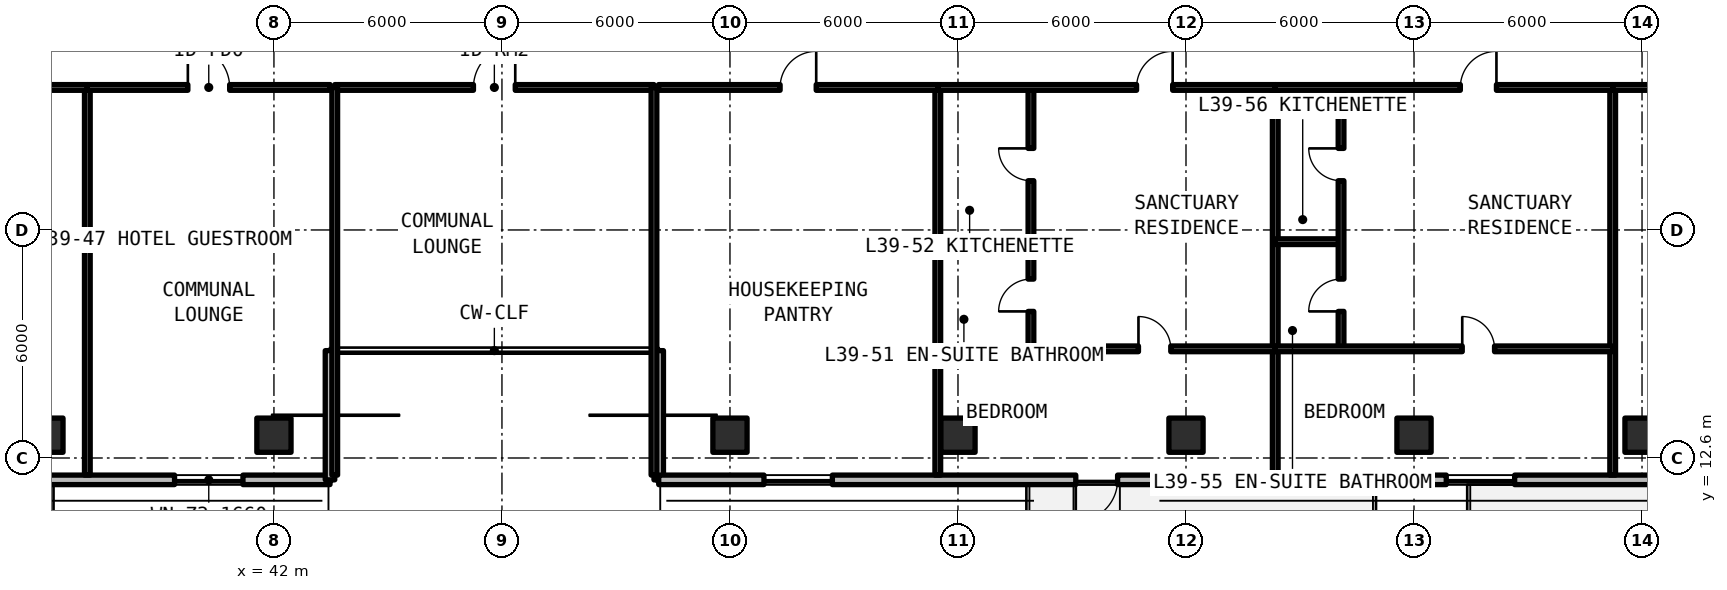
"""IFC4 building model, lengths in metres.
Left out: names, types, materials, properties, quantities, classifications, styles, units other than length and angle.
Written with IfcOpenShell. Run it as: python <this file> out.ifc"""

import sys

from ifc_helpers import new_model, si_unit, direction, frame, frame_2d, origin, origin_2d, place, context, subcontext, project, spatial, rectangle, extrude, element, fill, save


model = new_model("IFC4")
c1 = context("Model", 3, precision=1e-05, world=origin(), true_north=direction((0.0, 1.0)))
c2 = subcontext(c1, "Body", "Model", "MODEL_VIEW")
j1 = project(units=[si_unit("LENGTHUNIT", "METRE"), si_unit("PLANEANGLEUNIT", "RADIAN")], contexts=[c1])
p1 = place(None, origin())
s1 = spatial("IfcSite", under=j1, at=p1, CompositionType="ELEMENT")
p2 = place(p1, origin())
s2 = spatial("IfcBuilding", under=s1, at=p2, CompositionType="ELEMENT")
p3 = place(p2, frame((0.0, 0.0, 141.9)))
s3 = spatial("IfcBuildingStorey", under=s2, at=p3, CompositionType="ELEMENT", Elevation=141.9)
for number, where, z_axis, x_axis in (
    (1, (36.0, 13.2, 0.0), (0.0, 0.0, 1.0), (1.0, 0.0, 0.0)),
    (2, (42.0, 13.2, 0.0), (0.0, 0.0, 1.0), (1.0, 0.0, 0.0)),
    (3, (54.0, 13.2, 0.0), (0.0, 0.0, 1.0), (1.0, 0.0, 0.0)),
    (4, (60.0, 13.2, 0.0), (0.0, 0.0, 1.0), (1.0, 0.0, 0.0)),
    (5, (66.0, 13.2, 0.0), (0.0, 0.0, 1.0), (1.0, 0.0, 0.0)),
    (6, (72.0, 13.2, 0.0), (0.0, 0.0, 1.0), (1.0, 0.0, 0.0)),
    (7, (78.0, 13.2, 0.0), (0.0, 0.0, 1.0), (1.0, 0.0, 0.0)),
):
    element("IfcColumn", number, at=place(p3, frame(where, z_axis=z_axis, x_axis=x_axis)), inside=s3, PredefinedType="COLUMN", context=c2, shape_type="SweptSolid", body=[
        extrude(rectangle(XDim=0.9, YDim=0.9, at=origin_2d()), origin(), (0.0, 0.0, 1.0), 3.3),
    ])
p4 = place(p3, frame((23.852, 12.025, 0.0), z_axis=(0.0, 0.0, 1.0), x_axis=(1.0, 0.0, 0.0)))
e8 = element("IfcWall", 8, at=p4, inside=s3, PredefinedType="SOLIDWALL", context=c2, shape_type="SweptSolid", body=[
    extrude(rectangle(XDim=19.623, YDim=0.25, at=frame_2d((9.812, 0.0))), origin(), (0.0, 0.0, 1.0), 3.08),
])
p5 = place(p4, frame((3.598, 0.0, 0.0)))
e9 = element("IfcOpeningElement", 9, at=p5, cuts=e8, PredefinedType="OPENING", context=c2, shape_type="SweptSolid", body=[
    extrude(rectangle(XDim=1.1, YDim=2.15, at=frame_2d((0.55, 1.075))), frame((0.0, 0.135, 0.0), z_axis=(0.0, -1.0, 0.0), x_axis=(1.0, 0.0, 0.0)), (0.0, 0.0, 1.0), 0.27),
])
p6 = place(p4, frame((7.861, 0.0, 0.78)))
e10 = element("IfcOpeningElement", 10, at=p6, cuts=e8, PredefinedType="OPENING", context=c2, shape_type="SweptSolid", body=[
    extrude(rectangle(XDim=0.85, YDim=1.65, at=frame_2d((0.425, 0.825))), frame((0.0, 0.135, 0.0), z_axis=(0.0, -1.0, 0.0), x_axis=(1.0, 0.0, 0.0)), (0.0, 0.0, 1.0), 0.27),
])
p7 = place(p4, frame((9.915, 0.0, 0.78)))
e11 = element("IfcOpeningElement", 11, at=p7, cuts=e8, PredefinedType="OPENING", context=c2, shape_type="SweptSolid", body=[
    extrude(rectangle(XDim=1.4, YDim=1.65, at=frame_2d((0.7, 0.825))), frame((0.0, 0.135, 0.0), z_axis=(0.0, -1.0, 0.0), x_axis=(1.0, 0.0, 0.0)), (0.0, 0.0, 1.0), 0.27),
])
p8 = place(p4, frame((15.533, 0.0, 0.78)))
e12 = element("IfcOpeningElement", 12, at=p8, cuts=e8, PredefinedType="OPENING", context=c2, shape_type="SweptSolid", body=[
    extrude(rectangle(XDim=1.8, YDim=1.66, at=frame_2d((0.9, 0.83))), frame((0.0, 0.135, 0.0), z_axis=(0.0, -1.0, 0.0), x_axis=(1.0, 0.0, 0.0)), (0.0, 0.0, 1.0), 0.27),
])
for number, where, z_axis, x_axis in (
    (13, (43.475, 12.025, 0.0), (0.0, 0.0, 1.0), (0.0, 1.0, 0.0)),
    (14, (52.125, 15.425, 0.0), (0.0, 0.0, 1.0), (0.0, -1.0, 0.0)),
):
    element("IfcWall", number, at=place(p3, frame(where, z_axis=z_axis, x_axis=x_axis)), inside=s3, PredefinedType="SOLIDWALL", context=c2, shape_type="SweptSolid", body=[
        extrude(rectangle(XDim=3.4, YDim=0.25, at=frame_2d((1.7, 0.0))), origin(), (0.0, 0.0, 1.0), 3.08),
    ])
p9 = place(p3, frame((52.125, 12.025, 0.0), z_axis=(0.0, 0.0, 1.0), x_axis=(1.0, 0.0, 0.0)))
e15 = element("IfcWall", 15, at=p9, inside=s3, PredefinedType="SOLIDWALL", context=c2, shape_type="SweptSolid", body=[
    extrude(rectangle(XDim=43.623, YDim=0.25, at=frame_2d((21.812, 0.0))), origin(), (0.0, 0.0, 1.0), 3.08),
])
p10 = place(p9, frame((10.975, 0.0, 0.0)))
e16 = element("IfcOpeningElement", 16, at=p10, cuts=e15, PredefinedType="OPENING", context=c2, shape_type="SweptSolid", body=[
    extrude(rectangle(XDim=1.1, YDim=2.15, at=frame_2d((0.55, 1.075))), frame((0.0, 0.135, 0.0), z_axis=(0.0, -1.0, 0.0), x_axis=(1.0, 0.0, 0.0)), (0.0, 0.0, 1.0), 0.27),
])
p11 = place(p9, frame((27.575, 0.0, 0.0)))
e17 = element("IfcOpeningElement", 17, at=p11, cuts=e15, PredefinedType="OPENING", context=c2, shape_type="SweptSolid", body=[
    extrude(rectangle(XDim=1.1, YDim=2.15, at=frame_2d((0.55, 1.075))), frame((0.0, 0.135, 0.0), z_axis=(0.0, -1.0, 0.0), x_axis=(1.0, 0.0, 0.0)), (0.0, 0.0, 1.0), 0.27),
])
p12 = place(p9, frame((2.769, 0.0, 0.78)))
e18 = element("IfcOpeningElement", 18, at=p12, cuts=e15, PredefinedType="OPENING", context=c2, shape_type="SweptSolid", body=[
    extrude(rectangle(XDim=1.8, YDim=1.66, at=frame_2d((0.9, 0.83))), frame((0.0, 0.135, 0.0), z_axis=(0.0, -1.0, 0.0), x_axis=(1.0, 0.0, 0.0)), (0.0, 0.0, 1.0), 0.27),
])
p13 = place(p9, frame((20.723, 0.0, 0.78)))
e19 = element("IfcOpeningElement", 19, at=p13, cuts=e15, PredefinedType="OPENING", context=c2, shape_type="SweptSolid", body=[
    extrude(rectangle(XDim=1.8, YDim=1.66, at=frame_2d((0.9, 0.83))), frame((0.0, 0.135, 0.0), z_axis=(0.0, -1.0, 0.0), x_axis=(1.0, 0.0, 0.0)), (0.0, 0.0, 1.0), 0.27),
])
p14 = place(p9, frame((38.775, 0.0, 0.78)))
e20 = element("IfcOpeningElement", 20, at=p14, cuts=e15, PredefinedType="OPENING", context=c2, shape_type="SweptSolid", body=[
    extrude(rectangle(XDim=1.8, YDim=1.66, at=frame_2d((0.9, 0.83))), frame((0.0, 0.135, 0.0), z_axis=(0.0, -1.0, 0.0), x_axis=(1.0, 0.0, 0.0)), (0.0, 0.0, 1.0), 0.27),
])
p15 = place(p3, frame((43.6, 22.35, 0.0), z_axis=(0.0, 0.0, 1.0), x_axis=(1.0, 0.0, 0.0)))
e21 = element("IfcWall", 21, at=p15, inside=s3, PredefinedType="SOLIDWALL", context=c2, shape_type="SweptSolid", body=[
    extrude(rectangle(XDim=8.4, YDim=0.15, at=frame_2d((4.2, 0.0))), origin(), (0.0, 0.0, 1.0), 2.35),
])
p16 = place(p15, frame((3.65, 0.0, 0.0)))
e22 = element("IfcOpeningElement", 22, at=p16, cuts=e21, PredefinedType="OPENING", context=c2, shape_type="SweptSolid", body=[
    extrude(rectangle(XDim=1.1, YDim=2.15, at=frame_2d((0.55, 1.075))), frame((0.0, 0.085, 0.0), z_axis=(0.0, -1.0, 0.0), x_axis=(1.0, 0.0, 0.0)), (0.0, 0.0, 1.0), 0.17),
])
for number, where, z_axis, x_axis in (
    (23, (43.6, 12.15, 0.0), (0.0, 0.0, 1.0), (0.0, 1.0, 0.0)),
    (24, (52.0, 12.15, 0.0), (0.0, 0.0, 1.0), (0.0, 1.0, 0.0)),
    (25, (37.09, 12.15, 0.0), (0.0, 0.0, 1.0), (0.0, 1.0, 0.0)),
):
    element("IfcWall", number, at=place(p3, frame(where, z_axis=z_axis, x_axis=x_axis)), inside=s3, PredefinedType="SOLIDWALL", context=c2, shape_type="SweptSolid", body=[
        extrude(rectangle(XDim=10.2, YDim=0.15, at=frame_2d((5.1, 0.0))), origin(), (0.0, 0.0, 1.0), 2.35),
    ])
p17 = place(p3, frame((31.112, 22.35, 0.0), z_axis=(0.0, 0.0, 1.0), x_axis=(1.0, 0.0, 0.0)))
e26 = element("IfcWall", 26, at=p17, inside=s3, PredefinedType="SOLIDWALL", context=c2, shape_type="SweptSolid", body=[
    extrude(rectangle(XDim=5.978, YDim=0.15, at=frame_2d((2.989, 0.0))), origin(), (0.0, 0.0, 1.0), 2.35),
])
p18 = place(p17, frame((3.57, 0.0, 0.0)))
e27 = element("IfcOpeningElement", 27, at=p18, cuts=e26, PredefinedType="OPENING", context=c2, shape_type="SweptSolid", body=[
    extrude(rectangle(XDim=0.95, YDim=2.15, at=frame_2d((0.475, 1.075))), frame((0.0, 0.085, 0.0), z_axis=(0.0, -1.0, 0.0), x_axis=(1.0, 0.0, 0.0)), (0.0, 0.0, 1.0), 0.17),
])
p19 = place(p3, frame((37.09, 22.35, 0.0), z_axis=(0.0, 0.0, 1.0), x_axis=(1.0, 0.0, 0.0)))
e28 = element("IfcWall", 28, at=p19, inside=s3, PredefinedType="SOLIDWALL", context=c2, shape_type="SweptSolid", body=[
    extrude(rectangle(XDim=6.39, YDim=0.15, at=frame_2d((3.195, 0.0))), origin(), (0.0, 0.0, 1.0), 2.35),
])
p20 = place(p19, frame((2.645, 0.0, 0.0)))
e29 = element("IfcOpeningElement", 29, at=p20, cuts=e28, PredefinedType="OPENING", context=c2, shape_type="SweptSolid", body=[
    extrude(rectangle(XDim=1.1, YDim=2.15, at=frame_2d((0.55, 1.075))), frame((0.0, 0.085, 0.0), z_axis=(0.0, -1.0, 0.0), x_axis=(1.0, 0.0, 0.0)), (0.0, 0.0, 1.0), 0.17),
])
p21 = place(p3, frame((59.469, 12.15, 0.0), z_axis=(0.0, 0.0, 1.0), x_axis=(0.0, 1.0, 0.0)))
e30 = element("IfcWall", 30, at=p21, inside=s3, PredefinedType="SOLIDWALL", context=c2, shape_type="SweptSolid", body=[
    extrude(rectangle(XDim=10.2, YDim=0.15, at=frame_2d((5.1, 0.0))), origin(), (0.0, 0.0, 1.0), 2.35),
])
p22 = place(p3, frame((52.12, 22.35, 0.0), z_axis=(0.0, 0.0, 1.0), x_axis=(1.0, 0.0, 0.0)))
e31 = element("IfcWall", 31, at=p22, inside=s3, PredefinedType="SOLIDWALL", context=c2, shape_type="SweptSolid", body=[
    extrude(rectangle(XDim=7.349, YDim=0.15, at=frame_2d((3.674, 0.0))), origin(), (0.0, 0.0, 1.0), 2.35),
])
p23 = place(p22, frame((3.199, 0.0, 0.0)))
e32 = element("IfcOpeningElement", 32, at=p23, cuts=e31, PredefinedType="OPENING", context=c2, shape_type="SweptSolid", body=[
    extrude(rectangle(XDim=0.95, YDim=2.15, at=frame_2d((0.475, 1.075))), frame((0.0, 0.085, 0.0), z_axis=(0.0, -1.0, 0.0), x_axis=(1.0, 0.0, 0.0)), (0.0, 0.0, 1.0), 0.17),
])
p24 = place(p3, frame((68.348, 12.15, 0.0), z_axis=(0.0, 0.0, 1.0), x_axis=(0.0, 1.0, 0.0)))
e33 = element("IfcWall", 33, at=p24, inside=s3, PredefinedType="SOLIDWALL", context=c2, shape_type="SweptSolid", body=[
    extrude(rectangle(XDim=10.2, YDim=0.15, at=frame_2d((5.1, 0.0))), origin(), (0.0, 0.0, 1.0), 2.35),
])
p25 = place(p3, frame((59.469, 18.292, 0.0), z_axis=(0.0, 0.0, 1.0), x_axis=(1.0, 0.0, 0.0)))
e34 = element("IfcWall", 34, at=p25, inside=s3, PredefinedType="PARTITIONING", context=c2, shape_type="SweptSolid", body=[
    extrude(rectangle(XDim=2.451, YDim=0.15, at=frame_2d((1.226, 0.0))), origin(), (0.0, 0.0, 1.0), 2.35),
])
p26 = place(p3, frame((61.92, 15.472, 0.0), z_axis=(0.0, 0.0, 1.0), x_axis=(0.0, 1.0, 0.0)))
e35 = element("IfcWall", 35, at=p26, inside=s3, PredefinedType="PARTITIONING", context=c2, shape_type="SweptSolid", body=[
    extrude(rectangle(XDim=6.878, YDim=0.15, at=frame_2d((3.439, 0.0))), origin(), (0.0, 0.0, 1.0), 2.35),
])
p27 = place(p26, frame((0.985, 0.0, 0.0)))
e36 = element("IfcOpeningElement", 36, at=p27, cuts=e35, PredefinedType="OPENING", context=c2, shape_type="SweptSolid", body=[
    extrude(rectangle(XDim=0.85, YDim=2.1, at=frame_2d((0.425, 1.05))), frame((0.0, 0.085, 0.0), z_axis=(0.0, -1.0, 0.0), x_axis=(1.0, 0.0, 0.0)), (0.0, 0.0, 1.0), 0.17),
])
p28 = place(p26, frame((4.424, 0.0, 0.0)))
e37 = element("IfcOpeningElement", 37, at=p28, cuts=e35, PredefinedType="OPENING", context=c2, shape_type="SweptSolid", body=[
    extrude(rectangle(XDim=0.85, YDim=2.1, at=frame_2d((0.425, 1.05))), frame((0.0, 0.085, 0.0), z_axis=(0.0, -1.0, 0.0), x_axis=(1.0, 0.0, 0.0)), (0.0, 0.0, 1.0), 0.17),
])
p29 = place(p3, frame((59.469, 15.472, 0.0), z_axis=(0.0, 0.0, 1.0), x_axis=(1.0, 0.0, 0.0)))
e38 = element("IfcWall", 38, at=p29, inside=s3, PredefinedType="PARTITIONING", context=c2, shape_type="SweptSolid", body=[
    extrude(rectangle(XDim=8.88, YDim=0.15, at=frame_2d((4.44, 0.0))), origin(), (0.0, 0.0, 1.0), 2.35),
])
p30 = place(p29, frame((5.281, 0.0, 0.0)))
e39 = element("IfcOpeningElement", 39, at=p30, cuts=e38, PredefinedType="OPENING", context=c2, shape_type="SweptSolid", body=[
    extrude(rectangle(XDim=0.85, YDim=2.1, at=frame_2d((0.425, 1.05))), frame((0.0, 0.085, 0.0), z_axis=(0.0, -1.0, 0.0), x_axis=(1.0, 0.0, 0.0)), (0.0, 0.0, 1.0), 0.17),
])
p31 = place(p3, frame((59.469, 22.35, 0.0), z_axis=(0.0, 0.0, 1.0), x_axis=(1.0, 0.0, 0.0)))
e40 = element("IfcWall", 40, at=p31, inside=s3, PredefinedType="SOLIDWALL", context=c2, shape_type="SweptSolid", body=[
    extrude(rectangle(XDim=8.88, YDim=0.15, at=frame_2d((4.44, 0.0))), origin(), (0.0, 0.0, 1.0), 2.35),
])
p32 = place(p31, frame((5.23, 0.0, 0.0)))
e41 = element("IfcOpeningElement", 41, at=p32, cuts=e40, PredefinedType="OPENING", context=c2, shape_type="SweptSolid", body=[
    extrude(rectangle(XDim=0.95, YDim=2.15, at=frame_2d((0.475, 1.075))), frame((0.0, 0.085, 0.0), z_axis=(0.0, -1.0, 0.0), x_axis=(1.0, 0.0, 0.0)), (0.0, 0.0, 1.0), 0.17),
])
p33 = place(p3, frame((77.228, 12.15, 0.0), z_axis=(0.0, 0.0, 1.0), x_axis=(0.0, 1.0, 0.0)))
e42 = element("IfcWall", 42, at=p33, inside=s3, PredefinedType="SOLIDWALL", context=c2, shape_type="SweptSolid", body=[
    extrude(rectangle(XDim=10.2, YDim=0.15, at=frame_2d((5.1, 0.0))), origin(), (0.0, 0.0, 1.0), 2.35),
])
p34 = place(p3, frame((68.348, 18.292, 0.0), z_axis=(0.0, 0.0, 1.0), x_axis=(1.0, 0.0, 0.0)))
e43 = element("IfcWall", 43, at=p34, inside=s3, PredefinedType="PARTITIONING", context=c2, shape_type="SweptSolid", body=[
    extrude(rectangle(XDim=1.732, YDim=0.15, at=frame_2d((0.866, 0.0))), origin(), (0.0, 0.0, 1.0), 2.35),
])
p35 = place(p3, frame((70.08, 15.472, 0.0), z_axis=(0.0, 0.0, 1.0), x_axis=(0.0, 1.0, 0.0)))
e44 = element("IfcWall", 44, at=p35, inside=s3, PredefinedType="PARTITIONING", context=c2, shape_type="SweptSolid", body=[
    extrude(rectangle(XDim=6.878, YDim=0.15, at=frame_2d((3.439, 0.0))), origin(), (0.0, 0.0, 1.0), 2.35),
])
p36 = place(p35, frame((0.985, 0.0, 0.0)))
e45 = element("IfcOpeningElement", 45, at=p36, cuts=e44, PredefinedType="OPENING", context=c2, shape_type="SweptSolid", body=[
    extrude(rectangle(XDim=0.85, YDim=2.1, at=frame_2d((0.425, 1.05))), frame((0.0, 0.085, 0.0), z_axis=(0.0, -1.0, 0.0), x_axis=(1.0, 0.0, 0.0)), (0.0, 0.0, 1.0), 0.17),
])
p37 = place(p35, frame((4.424, 0.0, 0.0)))
e46 = element("IfcOpeningElement", 46, at=p37, cuts=e44, PredefinedType="OPENING", context=c2, shape_type="SweptSolid", body=[
    extrude(rectangle(XDim=0.85, YDim=2.1, at=frame_2d((0.425, 1.05))), frame((0.0, 0.085, 0.0), z_axis=(0.0, -1.0, 0.0), x_axis=(1.0, 0.0, 0.0)), (0.0, 0.0, 1.0), 0.17),
])
p38 = place(p3, frame((68.348, 15.472, 0.0), z_axis=(0.0, 0.0, 1.0), x_axis=(1.0, 0.0, 0.0)))
e47 = element("IfcWall", 47, at=p38, inside=s3, PredefinedType="PARTITIONING", context=c2, shape_type="SweptSolid", body=[
    extrude(rectangle(XDim=8.88, YDim=0.15, at=frame_2d((4.44, 0.0))), origin(), (0.0, 0.0, 1.0), 2.35),
])
p39 = place(p38, frame((4.921, 0.0, 0.0)))
e48 = element("IfcOpeningElement", 48, at=p39, cuts=e47, PredefinedType="OPENING", context=c2, shape_type="SweptSolid", body=[
    extrude(rectangle(XDim=0.85, YDim=2.1, at=frame_2d((0.425, 1.05))), frame((0.0, 0.085, 0.0), z_axis=(0.0, -1.0, 0.0), x_axis=(1.0, 0.0, 0.0)), (0.0, 0.0, 1.0), 0.17),
])
p40 = place(p3, frame((68.348, 22.35, 0.0), z_axis=(0.0, 0.0, 1.0), x_axis=(1.0, 0.0, 0.0)))
e49 = element("IfcWall", 49, at=p40, inside=s3, PredefinedType="SOLIDWALL", context=c2, shape_type="SweptSolid", body=[
    extrude(rectangle(XDim=8.88, YDim=0.15, at=frame_2d((4.44, 0.0))), origin(), (0.0, 0.0, 1.0), 2.35),
])
p41 = place(p40, frame((4.871, 0.0, 0.0)))
e50 = element("IfcOpeningElement", 50, at=p41, cuts=e49, PredefinedType="OPENING", context=c2, shape_type="SweptSolid", body=[
    extrude(rectangle(XDim=0.95, YDim=2.15, at=frame_2d((0.475, 1.075))), frame((0.0, 0.085, 0.0), z_axis=(0.0, -1.0, 0.0), x_axis=(1.0, 0.0, 0.0)), (0.0, 0.0, 1.0), 0.17),
])
p42 = place(p3, frame((77.228, 22.35, 0.0), z_axis=(0.0, 0.0, 1.0), x_axis=(1.0, 0.0, 0.0)))
e51 = element("IfcWall", 51, at=p42, inside=s3, PredefinedType="SOLIDWALL", context=c2, shape_type="SweptSolid", body=[
    extrude(rectangle(XDim=9.492, YDim=0.15, at=frame_2d((4.746, 0.0))), origin(), (0.0, 0.0, 1.0), 2.35),
])
p43 = place(p42, frame((4.196, 0.0, 0.0)))
e52 = element("IfcOpeningElement", 52, at=p43, cuts=e51, PredefinedType="OPENING", context=c2, shape_type="SweptSolid", body=[
    extrude(rectangle(XDim=1.1, YDim=2.15, at=frame_2d((0.55, 1.075))), frame((0.0, 0.085, 0.0), z_axis=(0.0, -1.0, 0.0), x_axis=(1.0, 0.0, 0.0)), (0.0, 0.0, 1.0), 0.17),
])
p44 = place(p8, origin())
e53 = element("IfcWindow", 53, at=p44, inside=s3, PartitioningType="SINGLE_PANEL", PredefinedType="WINDOW", context=c2, shape_type="SweptSolid", body=[
    extrude(rectangle(XDim=1.8, YDim=1.66, at=frame_2d((0.9, 0.83))), frame((0.0, 0.03, 0.0), z_axis=(0.0, -1.0, 0.0), x_axis=(1.0, 0.0, 0.0)), (0.0, 0.0, 1.0), 0.06),
])
fill(e12, e53)
p45 = place(p10, frame((1.1, 0.0, 0.0), z_axis=(0.0, 0.0, 1.0), x_axis=(-1.0, 0.0, 0.0)))
e54 = element("IfcDoor", 54, at=p45, inside=s3, OperationType="SINGLE_SWING_LEFT", PredefinedType="DOOR", context=c2, shape_type="SweptSolid", body=[
    extrude(rectangle(XDim=1.1, YDim=2.15, at=frame_2d((0.55, 1.075))), frame((0.0, 0.025, 0.0), z_axis=(0.0, -1.0, 0.0), x_axis=(1.0, 0.0, 0.0)), (0.0, 0.0, 1.0), 0.05),
])
fill(e16, e54)
p46 = place(p12, origin())
e55 = element("IfcWindow", 55, at=p46, inside=s3, PartitioningType="SINGLE_PANEL", PredefinedType="WINDOW", context=c2, shape_type="SweptSolid", body=[
    extrude(rectangle(XDim=1.8, YDim=1.66, at=frame_2d((0.9, 0.83))), frame((0.0, 0.03, 0.0), z_axis=(0.0, -1.0, 0.0), x_axis=(1.0, 0.0, 0.0)), (0.0, 0.0, 1.0), 0.06),
])
fill(e18, e55)
p47 = place(p13, origin())
e56 = element("IfcWindow", 56, at=p47, inside=s3, PartitioningType="SINGLE_PANEL", PredefinedType="WINDOW", context=c2, shape_type="SweptSolid", body=[
    extrude(rectangle(XDim=1.8, YDim=1.66, at=frame_2d((0.9, 0.83))), frame((0.0, 0.03, 0.0), z_axis=(0.0, -1.0, 0.0), x_axis=(1.0, 0.0, 0.0)), (0.0, 0.0, 1.0), 0.06),
])
fill(e19, e56)
p48 = place(p16, origin())
e57 = element("IfcDoor", 57, at=p48, inside=s3, OperationType="SINGLE_SWING_RIGHT", PredefinedType="DOOR", context=c2, shape_type="SweptSolid", body=[
    extrude(rectangle(XDim=1.1, YDim=2.15, at=frame_2d((0.55, 1.075))), frame((0.0, 0.025, 0.0), z_axis=(0.0, -1.0, 0.0), x_axis=(1.0, 0.0, 0.0)), (0.0, 0.0, 1.0), 0.05),
])
fill(e22, e57)
p49 = place(p20, origin())
e58 = element("IfcDoor", 58, at=p49, inside=s3, OperationType="SINGLE_SWING_LEFT", PredefinedType="DOOR", context=c2, shape_type="SweptSolid", body=[
    extrude(rectangle(XDim=1.1, YDim=2.15, at=frame_2d((0.55, 1.075))), frame((0.0, 0.025, 0.0), z_axis=(0.0, -1.0, 0.0), x_axis=(1.0, 0.0, 0.0)), (0.0, 0.0, 1.0), 0.05),
])
fill(e29, e58)
p50 = place(p23, origin())
e59 = element("IfcDoor", 59, at=p50, inside=s3, OperationType="SINGLE_SWING_RIGHT", PredefinedType="DOOR", context=c2, shape_type="SweptSolid", body=[
    extrude(rectangle(XDim=0.95, YDim=2.15, at=frame_2d((0.475, 1.075))), frame((0.0, 0.025, 0.0), z_axis=(0.0, -1.0, 0.0), x_axis=(1.0, 0.0, 0.0)), (0.0, 0.0, 1.0), 0.05),
])
fill(e32, e59)
p51 = place(p27, origin())
e60 = element("IfcDoor", 60, at=p51, inside=s3, OperationType="SINGLE_SWING_LEFT", PredefinedType="DOOR", context=c2, shape_type="SweptSolid", body=[
    extrude(rectangle(XDim=0.85, YDim=2.1, at=frame_2d((0.425, 1.05))), frame((0.0, 0.025, 0.0), z_axis=(0.0, -1.0, 0.0), x_axis=(1.0, 0.0, 0.0)), (0.0, 0.0, 1.0), 0.05),
])
fill(e36, e60)
p52 = place(p28, origin())
e61 = element("IfcDoor", 61, at=p52, inside=s3, OperationType="SINGLE_SWING_RIGHT", PredefinedType="DOOR", context=c2, shape_type="SweptSolid", body=[
    extrude(rectangle(XDim=0.85, YDim=2.1, at=frame_2d((0.425, 1.05))), frame((0.0, 0.025, 0.0), z_axis=(0.0, -1.0, 0.0), x_axis=(1.0, 0.0, 0.0)), (0.0, 0.0, 1.0), 0.05),
])
fill(e37, e61)
p53 = place(p30, origin())
e62 = element("IfcDoor", 62, at=p53, inside=s3, OperationType="SINGLE_SWING_LEFT", PredefinedType="DOOR", context=c2, shape_type="SweptSolid", body=[
    extrude(rectangle(XDim=0.85, YDim=2.1, at=frame_2d((0.425, 1.05))), frame((0.0, 0.025, 0.0), z_axis=(0.0, -1.0, 0.0), x_axis=(1.0, 0.0, 0.0)), (0.0, 0.0, 1.0), 0.05),
])
fill(e39, e62)
p54 = place(p32, origin())
e63 = element("IfcDoor", 63, at=p54, inside=s3, OperationType="SINGLE_SWING_RIGHT", PredefinedType="DOOR", context=c2, shape_type="SweptSolid", body=[
    extrude(rectangle(XDim=0.95, YDim=2.15, at=frame_2d((0.475, 1.075))), frame((0.0, 0.025, 0.0), z_axis=(0.0, -1.0, 0.0), x_axis=(1.0, 0.0, 0.0)), (0.0, 0.0, 1.0), 0.05),
])
fill(e41, e63)
p55 = place(p36, origin())
e64 = element("IfcDoor", 64, at=p55, inside=s3, OperationType="SINGLE_SWING_LEFT", PredefinedType="DOOR", context=c2, shape_type="SweptSolid", body=[
    extrude(rectangle(XDim=0.85, YDim=2.1, at=frame_2d((0.425, 1.05))), frame((0.0, 0.025, 0.0), z_axis=(0.0, -1.0, 0.0), x_axis=(1.0, 0.0, 0.0)), (0.0, 0.0, 1.0), 0.05),
])
fill(e45, e64)
p56 = place(p37, origin())
e65 = element("IfcDoor", 65, at=p56, inside=s3, OperationType="SINGLE_SWING_RIGHT", PredefinedType="DOOR", context=c2, shape_type="SweptSolid", body=[
    extrude(rectangle(XDim=0.85, YDim=2.1, at=frame_2d((0.425, 1.05))), frame((0.0, 0.025, 0.0), z_axis=(0.0, -1.0, 0.0), x_axis=(1.0, 0.0, 0.0)), (0.0, 0.0, 1.0), 0.05),
])
fill(e46, e65)
p57 = place(p39, origin())
e66 = element("IfcDoor", 66, at=p57, inside=s3, OperationType="SINGLE_SWING_LEFT", PredefinedType="DOOR", context=c2, shape_type="SweptSolid", body=[
    extrude(rectangle(XDim=0.85, YDim=2.1, at=frame_2d((0.425, 1.05))), frame((0.0, 0.025, 0.0), z_axis=(0.0, -1.0, 0.0), x_axis=(1.0, 0.0, 0.0)), (0.0, 0.0, 1.0), 0.05),
])
fill(e48, e66)
p58 = place(p41, origin())
e67 = element("IfcDoor", 67, at=p58, inside=s3, OperationType="SINGLE_SWING_RIGHT", PredefinedType="DOOR", context=c2, shape_type="SweptSolid", body=[
    extrude(rectangle(XDim=0.95, YDim=2.15, at=frame_2d((0.475, 1.075))), frame((0.0, 0.025, 0.0), z_axis=(0.0, -1.0, 0.0), x_axis=(1.0, 0.0, 0.0)), (0.0, 0.0, 1.0), 0.05),
])
fill(e50, e67)
save(model, sys.argv[1])
